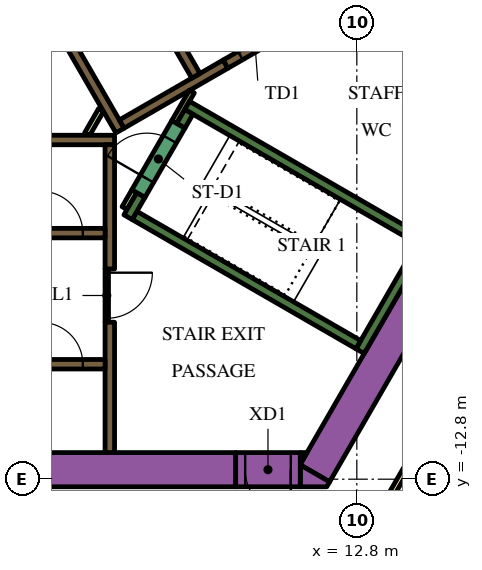
"""IFC4 building model, lengths in metres.
Left out: names, types, materials, properties, quantities, classifications, styles, units other than length and angle.
Written with IfcOpenShell. Run it as: python <this file> out.ifc"""

import sys

from ifc_helpers import new_model, si_unit, direction, frame, frame_2d, origin, place, context, subcontext, project, spatial, polyline, rectangle, outline, extrude, element, fill, save


model = new_model("IFC4")
c1 = context("Model", 3, precision=1e-05, world=origin(), true_north=direction((0.0, 1.0)))
c2 = subcontext(c1, "Body", "Model", "MODEL_VIEW")
j1 = project(units=[si_unit("LENGTHUNIT", "METRE"), si_unit("PLANEANGLEUNIT", "RADIAN")], contexts=[c1])
p1 = place(None, origin())
s1 = spatial("IfcSite", under=j1, at=p1, CompositionType="ELEMENT")
p2 = place(p1, origin())
s2 = spatial("IfcBuilding", under=s1, at=p2, CompositionType="ELEMENT")
p3 = place(p2, frame((0.0, 0.0, 103.2)))
s3 = spatial("IfcBuildingStorey", under=s2, at=p3, CompositionType="ELEMENT", Elevation=103.2)
p4 = place(p3, frame((6.711, 13.476, 0.0), z_axis=(0.0, 0.0, 1.0), x_axis=(0.500002723396, -0.866023831425, 0.0)))
e1 = element("IfcWall", 1, at=p4, inside=s3, PredefinedType="SOLIDWALL", context=c2, shape_type="SweptSolid", body=[
    extrude(rectangle(XDim=20.334, YDim=0.9, at=frame_2d((10.167, 0.0))), origin(), (0.0, 0.0, 1.0), 3.9),
])
p5 = place(p3, frame((11.695, -12.644, 0.0), z_axis=(0.0, 0.0, 1.0), x_axis=(0.500010229568, 0.86601949766, 0.0)))
e2 = element("IfcWall", 2, at=p5, inside=s3, PredefinedType="SOLIDWALL", context=c2, shape_type="SweptSolid", body=[
    extrude(rectangle(XDim=9.326, YDim=0.9, at=frame_2d((4.663, 0.0))), origin(), (0.0, 0.0, 1.0), 3.9),
])
p6 = place(p3, origin())
e3 = element("IfcWall", 3, at=p6, inside=s3, PredefinedType="SOLIDWALL", context=c2, shape_type="SweptSolid", body=[
    extrude(outline(polyline([(12.009, -13.0), (11.312, -13.0), (11.312, -12.425), (12.083, -12.871), (12.009, -13.0)])), origin(), (0.0, 0.0, 1.0), 3.9),
])
e4 = element("IfcWall", 4, at=p6, inside=s3, PredefinedType="SOLIDWALL", context=c2, shape_type="SweptSolid", body=[
    extrude(outline(polyline([(11.489, -12.1), (11.312, -12.407), (11.312, -12.1), (11.489, -12.1)])), origin(), (0.0, 0.0, 1.0), 3.9),
])
p7 = place(p3, frame((-12.019, -12.55, 0.0), z_axis=(0.0, 0.0, 1.0), x_axis=(1.0, 0.0, 0.0)))
e5 = element("IfcWall", 5, at=p7, inside=s3, PredefinedType="SOLIDWALL", context=c2, shape_type="SweptSolid", body=[
    extrude(rectangle(XDim=21.63, YDim=0.9, at=frame_2d((10.815, 0.0))), origin(), (0.0, 0.0, 1.0), 3.9),
])
p8 = place(p3, frame((12.885, -9.431, 0.0), z_axis=(0.0, 0.0, 1.0), x_axis=(0.500020560727, 0.866013532718, 0.0)))
e6 = element("IfcWall", 6, at=p8, inside=s3, PredefinedType="SOLIDWALL", context=c2, shape_type="SweptSolid", body=[
    extrude(rectangle(XDim=3.45, YDim=0.25, at=frame_2d((1.725, 0.0))), origin(), (0.0, 0.0, 1.0), 3.9),
])
p9 = place(p3, frame((12.84, -9.261, 0.0), z_axis=(0.0, 0.0, 1.0), x_axis=(-0.866013990052, 0.500019768644, 0.0)))
e7 = element("IfcWall", 7, at=p9, inside=s3, PredefinedType="SOLIDWALL", context=c2, shape_type="SweptSolid", body=[
    extrude(rectangle(XDim=6.8, YDim=0.25, at=frame_2d((3.4, 0.0))), origin(), (0.0, 0.0, 1.0), 3.9),
])
p10 = place(p3, frame((6.78, -5.906, 0.0), z_axis=(0.0, 0.0, 1.0), x_axis=(0.500223362819, 0.865896406789, 0.0)))
e8 = element("IfcWall", 8, at=p10, inside=s3, PredefinedType="SOLIDWALL", context=c2, shape_type="SweptSolid", body=[
    extrude(rectangle(XDim=0.675, YDim=0.25, at=frame_2d((0.337, 0.0))), origin(), (0.0, 0.0, 1.0), 3.9),
])
p11 = place(p3, frame((8.334, -2.964, 0.0), z_axis=(0.0, 0.0, 1.0), x_axis=(0.866016039709, -0.500016218704, 0.0)))
e9 = element("IfcWall", 9, at=p11, inside=s3, PredefinedType="SOLIDWALL", context=c2, shape_type="SweptSolid", body=[
    extrude(rectangle(XDim=7.05, YDim=0.25, at=frame_2d((3.525, 0.0))), origin(), (0.0, 0.0, 1.0), 3.9),
])
p12 = place(p3, frame((8.168, -3.503, 0.0), z_axis=(0.0, 0.0, 1.0), x_axis=(0.49972245349, 0.866185586049, 0.0)))
e10 = element("IfcWall", 10, at=p12, inside=s3, PredefinedType="SOLIDWALL", context=c2, shape_type="SweptSolid", body=[
    extrude(rectangle(XDim=0.425, YDim=0.25, at=frame_2d((0.212, 0.0))), origin(), (0.0, 0.0, 1.0), 3.9),
])
p13 = place(p3, frame((-5.545, -3.875, 0.0), z_axis=(0.0, 0.0, 1.0), x_axis=(1.0, 0.0, 0.0)))
e11 = element("IfcWall", 11, at=p13, inside=s3, PredefinedType="SOLIDWALL", context=c2, shape_type="SweptSolid", body=[
    extrude(rectangle(XDim=11.97, YDim=0.25, at=frame_2d((5.985, 0.0))), origin(), (0.0, 0.0, 1.0), 3.9),
])
p14 = place(p3, frame((6.3, -8.67, 0.0), z_axis=(0.0, 0.0, 1.0), x_axis=(0.0, -1.0, 0.0)))
e12 = element("IfcWall", 12, at=p14, inside=s3, PredefinedType="SOLIDWALL", context=c2, shape_type="SweptSolid", body=[
    extrude(rectangle(XDim=3.43, YDim=0.25, at=frame_2d((1.715, 0.0))), origin(), (0.0, 0.0, 1.0), 3.9),
])
p15 = place(p3, frame((6.3, -7.268, 0.0), z_axis=(0.0, 0.0, 1.0), x_axis=(0.0, 1.0, 0.0)))
e13 = element("IfcWall", 13, at=p15, inside=s3, PredefinedType="SOLIDWALL", context=c2, shape_type="SweptSolid", body=[
    extrude(rectangle(XDim=3.268, YDim=0.25, at=frame_2d((1.634, 0.0))), origin(), (0.0, 0.0, 1.0), 3.9),
])
e14 = element("IfcWall", 14, at=p6, inside=s3, PredefinedType="SOLIDWALL", context=c2, shape_type="SweptSolid", body=[
    extrude(outline(polyline([(0.566, 6.725), (0.566, 6.875), (0.566, 6.875), (0.565, 6.875), (0.361, 6.875), (0.035, 7.439), (0.252, 7.564), (0.377, 7.348), (6.552, -3.348), (6.677, -3.564), (6.46, -3.689), (0.448, 6.725), (0.565, 6.725), (0.566, 6.725), (0.566, 6.725)])), origin(), (0.0, 0.0, 1.0), 3.9),
])
p16 = place(p3, frame((6.614, -3.456, 0.0), z_axis=(0.0, 0.0, 1.0), x_axis=(0.86602447079, 0.500001615989, 0.0)))
e15 = element("IfcWall", 15, at=p16, inside=s3, PredefinedType="SOLIDWALL", context=c2, shape_type="SweptSolid", body=[
    extrude(rectangle(XDim=3.154, YDim=0.25, at=frame_2d((1.577, 0.0))), origin(), (0.0, 0.0, 1.0), 3.9),
])
p17 = place(p3, frame((6.945, -5.222, 0.0), z_axis=(0.0, 0.0, 1.0), x_axis=(-0.499818422106, -0.866130212453, 0.0)))
e16 = element("IfcWall", 16, at=p17, inside=s3, PredefinedType="PARTITIONING", context=c2, shape_type="SweptSolid", body=[
    extrude(rectangle(XDim=0.514, YDim=0.15, at=frame_2d((0.257, 0.0))), origin(), (0.0, 0.0, 1.0), 2.75),
])
p18 = place(p3, frame((5.705, -3.718, 0.0), z_axis=(0.0, 0.0, 1.0), x_axis=(0.499962090823, 0.866047289552, 0.0)))
e17 = element("IfcWall", 17, at=p18, inside=s3, PredefinedType="PARTITIONING", context=c2, shape_type="SweptSolid", body=[
    extrude(rectangle(XDim=0.735, YDim=0.15, at=frame_2d((0.367, 0.0))), origin(), (0.0, 0.0, 1.0), 2.75),
])
p19 = place(p3, frame((8.459, -2.599, 0.0), z_axis=(0.0, 0.0, 1.0), x_axis=(-0.500041054325, -0.866001699761, 0.0)))
e18 = element("IfcWall", 18, at=p19, inside=s3, PredefinedType="PARTITIONING", context=c2, shape_type="SweptSolid", body=[
    extrude(rectangle(XDim=0.929, YDim=0.15, at=frame_2d((0.464, 0.0))), origin(), (0.0, 0.0, 1.0), 3.9),
])
p20 = place(p3, frame((-6.175, -9.775, 0.0), z_axis=(0.0, 0.0, 1.0), x_axis=(1.0, 0.0, 0.0)))
e19 = element("IfcWall", 19, at=p20, inside=s3, PredefinedType="SOLIDWALL", context=c2, shape_type="SweptSolid", body=[
    extrude(rectangle(XDim=12.35, YDim=0.25, at=frame_2d((6.175, 0.0))), origin(), (0.0, 0.0, 1.0), 3.9),
])
p21 = place(p20, frame((0.585, 0.0, 0.0)))
e20 = element("IfcOpeningElement", 20, at=p21, cuts=e19, PredefinedType="OPENING", context=c2, shape_type="SweptSolid", body=[
    extrude(rectangle(XDim=1.1, YDim=2.1, at=frame_2d((0.55, 1.05))), frame((0.0, 0.135, 0.0), z_axis=(0.0, -1.0, 0.0), x_axis=(1.0, 0.0, 0.0)), (0.0, 0.0, 1.0), 0.27),
])
p22 = place(p20, frame((3.105, 0.0, 0.0)))
e21 = element("IfcOpeningElement", 21, at=p22, cuts=e19, PredefinedType="OPENING", context=c2, shape_type="SweptSolid", body=[
    extrude(rectangle(XDim=1.1, YDim=2.1, at=frame_2d((0.55, 1.05))), frame((0.0, 0.135, 0.0), z_axis=(0.0, -1.0, 0.0), x_axis=(1.0, 0.0, 0.0)), (0.0, 0.0, 1.0), 0.27),
])
p23 = place(p20, frame((5.625, 0.0, 0.0)))
e22 = element("IfcOpeningElement", 22, at=p23, cuts=e19, PredefinedType="OPENING", context=c2, shape_type="SweptSolid", body=[
    extrude(rectangle(XDim=1.1, YDim=2.1, at=frame_2d((0.55, 1.05))), frame((0.0, 0.135, 0.0), z_axis=(0.0, -1.0, 0.0), x_axis=(1.0, 0.0, 0.0)), (0.0, 0.0, 1.0), 0.27),
])
p24 = place(p20, frame((8.145, 0.0, 0.0)))
e23 = element("IfcOpeningElement", 23, at=p24, cuts=e19, PredefinedType="OPENING", context=c2, shape_type="SweptSolid", body=[
    extrude(rectangle(XDim=1.1, YDim=2.1, at=frame_2d((0.55, 1.05))), frame((0.0, 0.135, 0.0), z_axis=(0.0, -1.0, 0.0), x_axis=(1.0, 0.0, 0.0)), (0.0, 0.0, 1.0), 0.27),
])
p25 = place(p20, frame((10.665, 0.0, 0.0)))
e24 = element("IfcOpeningElement", 24, at=p25, cuts=e19, PredefinedType="OPENING", context=c2, shape_type="SweptSolid", body=[
    extrude(rectangle(XDim=1.1, YDim=2.1, at=frame_2d((0.55, 1.05))), frame((0.0, 0.135, 0.0), z_axis=(0.0, -1.0, 0.0), x_axis=(1.0, 0.0, 0.0)), (0.0, 0.0, 1.0), 0.27),
])
p26 = place(p3, frame((-6.175, -6.325, 0.0), z_axis=(0.0, 0.0, 1.0), x_axis=(1.0, 0.0, 0.0)))
e25 = element("IfcWall", 25, at=p26, inside=s3, PredefinedType="SOLIDWALL", context=c2, shape_type="SweptSolid", body=[
    extrude(rectangle(XDim=12.35, YDim=0.25, at=frame_2d((6.175, 0.0))), origin(), (0.0, 0.0, 1.0), 3.9),
])
p27 = place(p26, frame((3.205, 0.0, 0.0)))
e26 = element("IfcOpeningElement", 26, at=p27, cuts=e25, PredefinedType="OPENING", context=c2, shape_type="SweptSolid", body=[
    extrude(rectangle(XDim=0.9, YDim=2.1, at=frame_2d((0.45, 1.05))), frame((0.0, 0.135, 0.0), z_axis=(0.0, -1.0, 0.0), x_axis=(1.0, 0.0, 0.0)), (0.0, 0.0, 1.0), 0.27),
])
p28 = place(p26, frame((8.145, 0.0, 0.0)))
e27 = element("IfcOpeningElement", 27, at=p28, cuts=e25, PredefinedType="OPENING", context=c2, shape_type="SweptSolid", body=[
    extrude(rectangle(XDim=1.1, YDim=2.1, at=frame_2d((0.55, 1.05))), frame((0.0, 0.135, 0.0), z_axis=(0.0, -1.0, 0.0), x_axis=(1.0, 0.0, 0.0)), (0.0, 0.0, 1.0), 0.27),
])
p29 = place(p26, frame((10.665, 0.0, 0.0)))
e28 = element("IfcOpeningElement", 28, at=p29, cuts=e25, PredefinedType="OPENING", context=c2, shape_type="SweptSolid", body=[
    extrude(rectangle(XDim=1.1, YDim=2.1, at=frame_2d((0.55, 1.05))), frame((0.0, 0.135, 0.0), z_axis=(0.0, -1.0, 0.0), x_axis=(1.0, 0.0, 0.0)), (0.0, 0.0, 1.0), 0.27),
])
p30 = place(p3, frame((8.565, -2.185, 0.0), z_axis=(0.0, 0.0, 1.0), x_axis=(-0.499997954832, 0.866026584559, 0.0)))
e29 = element("IfcWall", 29, at=p30, inside=s3, PredefinedType="SOLIDWALL", context=c2, shape_type="SweptSolid", body=[
    extrude(rectangle(XDim=12.35, YDim=0.25, at=frame_2d((6.175, 0.0))), origin(), (0.0, 0.0, 1.0), 3.9),
])
p31 = place(p30, frame((5.725, 0.0, 0.0)))
e30 = element("IfcOpeningElement", 30, at=p31, cuts=e29, PredefinedType="OPENING", context=c2, shape_type="SweptSolid", body=[
    extrude(rectangle(XDim=0.9, YDim=2.1, at=frame_2d((0.45, 1.05))), frame((0.0, 0.135, 0.0), z_axis=(0.0, -1.0, 0.0), x_axis=(1.0, 0.0, 0.0)), (0.0, 0.0, 1.0), 0.27),
])
p32 = place(p3, frame((7.053, -5.284, 0.0), z_axis=(0.0, 0.0, 1.0), x_axis=(0.500078061341, 0.865980330357, 0.0)))
e31 = element("IfcWall", 31, at=p32, inside=s3, PredefinedType="SOLIDWALL", context=c2, shape_type="SweptSolid", body=[
    extrude(rectangle(XDim=2.1, YDim=0.4, at=frame_2d((1.05, 0.0))), origin(), (0.0, 0.0, 1.0), 3.9),
])
p33 = place(p32, frame((0.45, 0.0, 0.0)))
e32 = element("IfcOpeningElement", 32, at=p33, cuts=e31, PredefinedType="OPENING", context=c2, shape_type="SweptSolid", body=[
    extrude(rectangle(XDim=1.2, YDim=2.1, at=frame_2d((0.6, 1.05))), frame((0.0, 0.21, 0.0), z_axis=(0.0, -1.0, 0.0), x_axis=(1.0, 0.0, 0.0)), (0.0, 0.0, 1.0), 0.42),
])
p34 = place(p3, frame((9.346, -1.879, 0.0), z_axis=(0.0, 0.0, 1.0), x_axis=(0.866047807691, 0.499961193289, 0.0)))
e33 = element("IfcWall", 33, at=p34, inside=s3, PredefinedType="SOLIDWALL", context=c2, shape_type="SweptSolid", body=[
    extrude(rectangle(XDim=1.8, YDim=0.25, at=frame_2d((0.9, 0.0))), origin(), (0.0, 0.0, 1.0), 3.9),
])
p35 = place(p34, frame((0.45, 0.0, 0.0)))
e34 = element("IfcOpeningElement", 34, at=p35, cuts=e33, PredefinedType="OPENING", context=c2, shape_type="SweptSolid", body=[
    extrude(rectangle(XDim=0.9, YDim=2.1, at=frame_2d((0.45, 1.05))), frame((0.0, 0.135, 0.0), z_axis=(0.0, -1.0, 0.0), x_axis=(1.0, 0.0, 0.0)), (0.0, 0.0, 1.0), 0.27),
])
p36 = place(p3, frame((6.22, -7.266, 0.0), z_axis=(0.0, 0.0, 1.0), x_axis=(0.0, -1.0, 0.0)))
e35 = element("IfcWall", 35, at=p36, inside=s3, PredefinedType="PARTITIONING", context=c2, shape_type="SweptSolid", body=[
    extrude(rectangle(XDim=1.4, YDim=0.09, at=frame_2d((0.7, 0.0))), origin(), (0.0, 0.0, 1.0), 2.75),
])
p37 = place(p36, frame((0.1, 0.0, 0.0)))
e36 = element("IfcOpeningElement", 36, at=p37, cuts=e35, PredefinedType="OPENING", context=c2, shape_type="SweptSolid", body=[
    extrude(rectangle(XDim=1.2, YDim=2.1, at=frame_2d((0.6, 1.05))), frame((0.0, 0.055, 0.0), z_axis=(0.0, -1.0, 0.0), x_axis=(1.0, 0.0, 0.0)), (0.0, 0.0, 1.0), 0.11),
])
p38 = place(p3, frame((11.312, -12.55, 0.0), z_axis=(0.0, 0.0, 1.0), x_axis=(-1.0, 0.0, 0.0)))
e37 = element("IfcWall", 37, at=p38, inside=s3, PredefinedType="SOLIDWALL", context=c2, shape_type="SweptSolid", body=[
    extrude(rectangle(XDim=1.7, YDim=0.9, at=frame_2d((0.85, 0.0))), origin(), (0.0, 0.0, 1.0), 3.9),
])
p39 = place(p38, frame((0.25, 0.0, 0.0)))
e38 = element("IfcOpeningElement", 38, at=p39, cuts=e37, PredefinedType="OPENING", context=c2, shape_type="SweptSolid", body=[
    extrude(rectangle(XDim=1.2, YDim=2.1, at=frame_2d((0.6, 1.05))), frame((0.0, 0.46, 0.0), z_axis=(0.0, -1.0, 0.0), x_axis=(1.0, 0.0, 0.0)), (0.0, 0.0, 1.0), 0.92),
])
p40 = place(p3, frame((6.163, 18.475, 0.0), z_axis=(0.0, 0.0, 1.0), x_axis=(0.500001317485, -0.866024643133, 0.0)))
e39 = element("IfcWall", 39, at=p40, inside=s3, PredefinedType="PARTITIONING", context=c2, shape_type="SweptSolid", body=[
    extrude(rectangle(XDim=25.767, YDim=0.15, at=frame_2d((12.883, 0.0))), origin(), (0.0, 0.0, 1.0), 2.75),
])
p41 = place(p40, frame((24.241, 0.0, 0.0)))
e40 = element("IfcOpeningElement", 40, at=p41, cuts=e39, PredefinedType="OPENING", context=c2, shape_type="SweptSolid", body=[
    extrude(rectangle(XDim=1.0, YDim=2.1, at=frame_2d((0.5, 1.05))), frame((0.0, 0.085, 0.0), z_axis=(0.0, -1.0, 0.0), x_axis=(1.0, 0.0, 0.0)), (0.0, 0.0, 1.0), 0.17),
])
p42 = place(p40, frame((13.144, 0.0, 0.0)))
e41 = element("IfcOpeningElement", 41, at=p42, cuts=e39, PredefinedType="OPENING", context=c2, shape_type="SweptSolid", body=[
    extrude(rectangle(XDim=1.0, YDim=2.1, at=frame_2d((0.5, 1.05))), frame((0.0, 0.085, 0.0), z_axis=(0.0, -1.0, 0.0), x_axis=(1.0, 0.0, 0.0)), (0.0, 0.0, 1.0), 0.17),
])
p43 = place(p40, frame((11.592, 0.0, 0.0)))
e42 = element("IfcOpeningElement", 42, at=p43, cuts=e39, PredefinedType="OPENING", context=c2, shape_type="SweptSolid", body=[
    extrude(rectangle(XDim=1.1, YDim=2.1, at=frame_2d((0.55, 1.05))), frame((0.0, 0.085, 0.0), z_axis=(0.0, -1.0, 0.0), x_axis=(1.0, 0.0, 0.0)), (0.0, 0.0, 1.0), 0.17),
])
p44 = place(p40, frame((4.674, 0.0, 0.0)))
e43 = element("IfcOpeningElement", 43, at=p44, cuts=e39, PredefinedType="OPENING", context=c2, shape_type="SweptSolid", body=[
    extrude(rectangle(XDim=0.9, YDim=2.1, at=frame_2d((0.45, 1.05))), frame((0.0, 0.085, 0.0), z_axis=(0.0, -1.0, 0.0), x_axis=(1.0, 0.0, 0.0)), (0.0, 0.0, 1.0), 0.17),
])
p45 = place(p40, frame((2.411, 0.0, 0.0)))
e44 = element("IfcOpeningElement", 44, at=p45, cuts=e39, PredefinedType="OPENING", context=c2, shape_type="SweptSolid", body=[
    extrude(rectangle(XDim=1.0, YDim=2.1, at=frame_2d((0.5, 1.05))), frame((0.0, 0.085, 0.0), z_axis=(0.0, -1.0, 0.0), x_axis=(1.0, 0.0, 0.0)), (0.0, 0.0, 1.0), 0.17),
])
p46 = place(p3, frame((15.587, -9.952, 0.0), z_axis=(0.0, 0.0, 1.0), x_axis=(-0.500016618951, -0.866015808616, 0.0)))
e45 = element("IfcWall", 45, at=p46, inside=s3, PredefinedType="PARTITIONING", context=c2, shape_type="SweptSolid", body=[
    extrude(rectangle(XDim=5.268, YDim=0.15, at=frame_2d((2.634, 0.0))), origin(), (0.0, 0.0, 1.0), 2.75),
])
p47 = place(p46, frame((4.088, 0.0, 0.0)))
e46 = element("IfcOpeningElement", 46, at=p47, cuts=e45, PredefinedType="OPENING", context=c2, shape_type="SweptSolid", body=[
    extrude(rectangle(XDim=1.0, YDim=2.1, at=frame_2d((0.5, 1.05))), frame((0.0, 0.085, 0.0), z_axis=(0.0, -1.0, 0.0), x_axis=(1.0, 0.0, 0.0)), (0.0, 0.0, 1.0), 0.17),
])
p48 = place(p25, origin())
e47 = element("IfcDoor", 47, at=p48, inside=s3, OperationType="DOUBLE_DOOR_SLIDING", PredefinedType="DOOR", context=c2, shape_type="SweptSolid", body=[
    extrude(rectangle(XDim=1.1, YDim=2.1, at=frame_2d((0.55, 1.05))), frame((0.0, 0.025, 0.0), z_axis=(0.0, -1.0, 0.0), x_axis=(1.0, 0.0, 0.0)), (0.0, 0.0, 1.0), 0.05),
])
fill(e24, e47)
p49 = place(p29, origin())
e48 = element("IfcDoor", 48, at=p49, inside=s3, OperationType="DOUBLE_DOOR_SLIDING", PredefinedType="DOOR", context=c2, shape_type="SweptSolid", body=[
    extrude(rectangle(XDim=1.1, YDim=2.1, at=frame_2d((0.55, 1.05))), frame((0.0, 0.025, 0.0), z_axis=(0.0, -1.0, 0.0), x_axis=(1.0, 0.0, 0.0)), (0.0, 0.0, 1.0), 0.05),
])
fill(e28, e48)
p50 = place(p33, origin())
e49 = element("IfcDoor", 49, at=p50, inside=s3, OperationType="SINGLE_SWING_LEFT", PredefinedType="DOOR", context=c2, shape_type="SweptSolid", body=[
    extrude(rectangle(XDim=1.2, YDim=2.1, at=frame_2d((0.6, 1.05))), frame((0.0, 0.025, 0.0), z_axis=(0.0, -1.0, 0.0), x_axis=(1.0, 0.0, 0.0)), (0.0, 0.0, 1.0), 0.05),
])
fill(e32, e49)
p51 = place(p35, origin())
e50 = element("IfcDoor", 50, at=p51, inside=s3, OperationType="SINGLE_SWING_LEFT", PredefinedType="DOOR", context=c2, shape_type="SweptSolid", body=[
    extrude(rectangle(XDim=0.9, YDim=2.1, at=frame_2d((0.45, 1.05))), frame((0.0, 0.025, 0.0), z_axis=(0.0, -1.0, 0.0), x_axis=(1.0, 0.0, 0.0)), (0.0, 0.0, 1.0), 0.05),
])
fill(e34, e50)
p52 = place(p37, origin())
e51 = element("IfcDoor", 51, at=p52, inside=s3, OperationType="SINGLE_SWING_LEFT", PredefinedType="DOOR", context=c2, shape_type="SweptSolid", body=[
    extrude(rectangle(XDim=1.2, YDim=2.1, at=frame_2d((0.6, 1.05))), frame((0.0, 0.025, 0.0), z_axis=(0.0, -1.0, 0.0), x_axis=(1.0, 0.0, 0.0)), (0.0, 0.0, 1.0), 0.05),
])
fill(e36, e51)
p53 = place(p39, origin())
e52 = element("IfcDoor", 52, at=p53, inside=s3, OperationType="SINGLE_SWING_LEFT", PredefinedType="DOOR", context=c2, shape_type="SweptSolid", body=[
    extrude(rectangle(XDim=1.2, YDim=2.1, at=frame_2d((0.6, 1.05))), frame((0.0, 0.025, 0.0), z_axis=(0.0, -1.0, 0.0), x_axis=(1.0, 0.0, 0.0)), (0.0, 0.0, 1.0), 0.05),
])
fill(e38, e52)
save(model, sys.argv[1])
